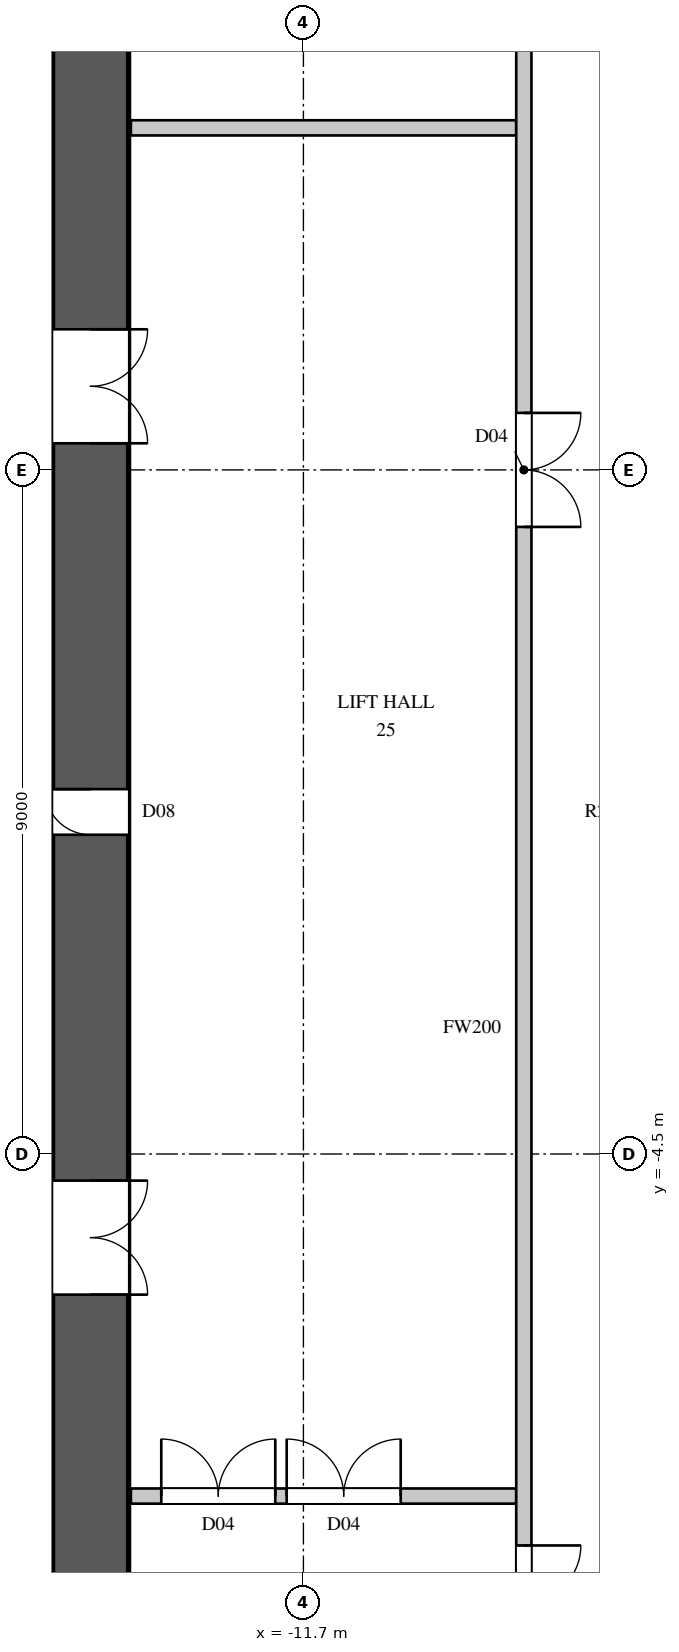
"""IFC4 building model, lengths in metres.
Left out: names, types, materials, properties, quantities, classifications, styles, units other than length and angle.
Written with IfcOpenShell. Run it as: python <this file> out.ifc"""

import sys

from ifc_helpers import new_model, si_unit, direction, frame, frame_2d, origin, place, context, subcontext, project, spatial, rectangle, extrude, element, fill, save


model = new_model("IFC4")
c1 = context("Model", 3, precision=1e-05, world=origin(), true_north=direction((0.0, 1.0)))
c2 = subcontext(c1, "Body", "Model", "MODEL_VIEW")
j1 = project(units=[si_unit("LENGTHUNIT", "METRE"), si_unit("PLANEANGLEUNIT", "RADIAN")], contexts=[c1])
p1 = place(None, origin())
s1 = spatial("IfcSite", under=j1, at=p1, CompositionType="ELEMENT")
p2 = place(p1, origin())
s2 = spatial("IfcBuilding", under=s1, at=p2, CompositionType="ELEMENT")
p3 = place(p2, frame((0.0, 0.0, 120.3)))
s3 = spatial("IfcBuildingStorey", under=s2, at=p3, CompositionType="ELEMENT", Elevation=120.3)
p4 = place(p3, frame((-14.5, -14.8, 0.0), z_axis=(0.0, 0.0, 1.0), x_axis=(0.0, 1.0, 0.0)))
e1 = element("IfcWall", 1, at=p4, inside=s3, PredefinedType="SHEAR", context=c2, shape_type="SweptSolid", body=[
    extrude(rectangle(XDim=29.6, YDim=1.0, at=frame_2d((14.8, 0.0))), origin(), (0.0, 0.0, 1.0), 3.6),
])
p5 = place(p4, frame((8.45, 0.0, 0.0)))
e2 = element("IfcOpeningElement", 2, at=p5, cuts=e1, PredefinedType="OPENING", context=c2, shape_type="SweptSolid", body=[
    extrude(rectangle(XDim=1.5, YDim=2.4, at=frame_2d((0.75, 1.2))), frame((0.0, 0.51, 0.0), z_axis=(0.0, -1.0, 0.0), x_axis=(1.0, 0.0, 0.0)), (0.0, 0.0, 1.0), 1.02),
])
p6 = place(p4, frame((19.65, 0.0, 0.0)))
e3 = element("IfcOpeningElement", 3, at=p6, cuts=e1, PredefinedType="OPENING", context=c2, shape_type="SweptSolid", body=[
    extrude(rectangle(XDim=1.5, YDim=2.4, at=frame_2d((0.75, 1.2))), frame((0.0, 0.51, 0.0), z_axis=(0.0, -1.0, 0.0), x_axis=(1.0, 0.0, 0.0)), (0.0, 0.0, 1.0), 1.02),
])
p7 = place(p4, frame((14.5, 0.0, 0.0)))
e4 = element("IfcOpeningElement", 4, at=p7, cuts=e1, PredefinedType="OPENING", context=c2, shape_type="SweptSolid", body=[
    extrude(rectangle(XDim=0.6, YDim=2.0, at=frame_2d((0.3, 1.0))), frame((0.0, 0.51, 0.0), z_axis=(0.0, -1.0, 0.0), x_axis=(1.0, 0.0, 0.0)), (0.0, 0.0, 1.0), 1.02),
])
p8 = place(p3, frame((-13.97, -9.0, 0.0), z_axis=(0.0, 0.0, 1.0), x_axis=(1.0, 0.0, 0.0)))
e5 = element("IfcWall", 5, at=p8, inside=s3, PredefinedType="PARTITIONING", context=c2, shape_type="SweptSolid", body=[
    extrude(rectangle(XDim=5.07, YDim=0.2, at=frame_2d((2.535, 0.0))), origin(), (0.0, 0.0, 1.0), 3.3),
])
p9 = place(p8, frame((0.4, 0.0, 0.0)))
e6 = element("IfcOpeningElement", 6, at=p9, cuts=e5, PredefinedType="OPENING", context=c2, shape_type="SweptSolid", body=[
    extrude(rectangle(XDim=1.5, YDim=2.2, at=frame_2d((0.75, 1.1))), frame((0.0, 0.11, 0.0), z_axis=(0.0, -1.0, 0.0), x_axis=(1.0, 0.0, 0.0)), (0.0, 0.0, 1.0), 0.22),
])
p10 = place(p8, frame((2.05, 0.0, 0.0)))
e7 = element("IfcOpeningElement", 7, at=p10, cuts=e5, PredefinedType="OPENING", context=c2, shape_type="SweptSolid", body=[
    extrude(rectangle(XDim=1.5, YDim=2.2, at=frame_2d((0.75, 1.1))), frame((0.0, 0.11, 0.0), z_axis=(0.0, -1.0, 0.0), x_axis=(1.0, 0.0, 0.0)), (0.0, 0.0, 1.0), 0.22),
])
p11 = place(p3, frame((-13.97, 9.0, 0.0), z_axis=(0.0, 0.0, 1.0), x_axis=(1.0, 0.0, 0.0)))
e8 = element("IfcWall", 8, at=p11, inside=s3, PredefinedType="PARTITIONING", context=c2, shape_type="SweptSolid", body=[
    extrude(rectangle(XDim=5.07, YDim=0.2, at=frame_2d((2.535, 0.0))), origin(), (0.0, 0.0, 1.0), 3.3),
])
p12 = place(p3, frame((-8.8, -17.4, 0.0), z_axis=(0.0, 0.0, 1.0), x_axis=(0.0, 1.0, 0.0)))
e9 = element("IfcWall", 9, at=p12, inside=s3, PredefinedType="PARTITIONING", context=c2, shape_type="SweptSolid", body=[
    extrude(rectangle(XDim=29.1, YDim=0.2, at=frame_2d((14.55, 0.0))), origin(), (0.0, 0.0, 1.0), 3.3),
])
p13 = place(p12, frame((21.15, 0.0, 0.0)))
e10 = element("IfcOpeningElement", 10, at=p13, cuts=e9, PredefinedType="OPENING", context=c2, shape_type="SweptSolid", body=[
    extrude(rectangle(XDim=1.5, YDim=2.2, at=frame_2d((0.75, 1.1))), frame((0.0, 0.11, 0.0), z_axis=(0.0, -1.0, 0.0), x_axis=(1.0, 0.0, 0.0)), (0.0, 0.0, 1.0), 0.22),
])
p14 = place(p12, frame((6.25, 0.0, 0.0)))
e11 = element("IfcOpeningElement", 11, at=p14, cuts=e9, PredefinedType="OPENING", context=c2, shape_type="SweptSolid", body=[
    extrude(rectangle(XDim=1.5, YDim=2.2, at=frame_2d((0.75, 1.1))), frame((0.0, 0.11, 0.0), z_axis=(0.0, -1.0, 0.0), x_axis=(1.0, 0.0, 0.0)), (0.0, 0.0, 1.0), 0.22),
])
p15 = place(p12, frame((27.45, 0.0, 0.0)))
e12 = element("IfcOpeningElement", 12, at=p15, cuts=e9, PredefinedType="OPENING", context=c2, shape_type="SweptSolid", body=[
    extrude(rectangle(XDim=1.5, YDim=2.2, at=frame_2d((0.75, 1.1))), frame((0.0, 0.11, 0.0), z_axis=(0.0, -1.0, 0.0), x_axis=(1.0, 0.0, 0.0)), (0.0, 0.0, 1.0), 0.22),
])
p16 = place(p12, frame((0.15, 0.0, 0.0)))
e13 = element("IfcOpeningElement", 13, at=p16, cuts=e9, PredefinedType="OPENING", context=c2, shape_type="SweptSolid", body=[
    extrude(rectangle(XDim=0.9, YDim=2.2, at=frame_2d((0.45, 1.1))), frame((0.0, 0.11, 0.0), z_axis=(0.0, -1.0, 0.0), x_axis=(1.0, 0.0, 0.0)), (0.0, 0.0, 1.0), 0.22),
])
p17 = place(p13, origin())
e14 = element("IfcDoor", 14, at=p17, inside=s3, OperationType="DOUBLE_DOOR_SINGLE_SWING", PredefinedType="DOOR", context=c2, shape_type="SweptSolid", body=[
    extrude(rectangle(XDim=1.5, YDim=2.2, at=frame_2d((0.75, 1.1))), frame((0.0, 0.025, 0.0), z_axis=(0.0, -1.0, 0.0), x_axis=(1.0, 0.0, 0.0)), (0.0, 0.0, 1.0), 0.05),
])
fill(e10, e14)
p18 = place(p9, origin())
e15 = element("IfcDoor", 15, at=p18, inside=s3, OperationType="DOUBLE_DOOR_SINGLE_SWING", PredefinedType="DOOR", context=c2, shape_type="SweptSolid", body=[
    extrude(rectangle(XDim=1.5, YDim=2.2, at=frame_2d((0.75, 1.1))), frame((0.0, 0.025, 0.0), z_axis=(0.0, -1.0, 0.0), x_axis=(1.0, 0.0, 0.0)), (0.0, 0.0, 1.0), 0.05),
])
fill(e6, e15)
p19 = place(p10, origin())
e16 = element("IfcDoor", 16, at=p19, inside=s3, OperationType="DOUBLE_DOOR_SINGLE_SWING", PredefinedType="DOOR", context=c2, shape_type="SweptSolid", body=[
    extrude(rectangle(XDim=1.5, YDim=2.2, at=frame_2d((0.75, 1.1))), frame((0.0, 0.025, 0.0), z_axis=(0.0, -1.0, 0.0), x_axis=(1.0, 0.0, 0.0)), (0.0, 0.0, 1.0), 0.05),
])
fill(e7, e16)
p20 = place(p14, origin())
e17 = element("IfcDoor", 17, at=p20, inside=s3, OperationType="DOUBLE_DOOR_SINGLE_SWING", PredefinedType="DOOR", context=c2, shape_type="SweptSolid", body=[
    extrude(rectangle(XDim=1.5, YDim=2.2, at=frame_2d((0.75, 1.1))), frame((0.0, 0.025, 0.0), z_axis=(0.0, -1.0, 0.0), x_axis=(1.0, 0.0, 0.0)), (0.0, 0.0, 1.0), 0.05),
])
fill(e11, e17)
p21 = place(p5, origin())
e18 = element("IfcDoor", 18, at=p21, inside=s3, OperationType="DOUBLE_DOOR_SINGLE_SWING", PredefinedType="DOOR", context=c2, shape_type="SweptSolid", body=[
    extrude(rectangle(XDim=1.5, YDim=2.4, at=frame_2d((0.75, 1.2))), frame((0.0, -0.445, 0.0), z_axis=(0.0, -1.0, 0.0), x_axis=(1.0, 0.0, 0.0)), (0.0, 0.0, 1.0), 0.05),
])
fill(e2, e18)
p22 = place(p6, origin())
e19 = element("IfcDoor", 19, at=p22, inside=s3, OperationType="DOUBLE_DOOR_SINGLE_SWING", PredefinedType="DOOR", context=c2, shape_type="SweptSolid", body=[
    extrude(rectangle(XDim=1.5, YDim=2.4, at=frame_2d((0.75, 1.2))), frame((0.0, -0.445, 0.0), z_axis=(0.0, -1.0, 0.0), x_axis=(1.0, 0.0, 0.0)), (0.0, 0.0, 1.0), 0.05),
])
fill(e3, e19)
p23 = place(p7, origin())
e20 = element("IfcDoor", 20, at=p23, inside=s3, OperationType="SINGLE_SWING_RIGHT", PredefinedType="DOOR", context=c2, shape_type="SweptSolid", body=[
    extrude(rectangle(XDim=0.6, YDim=2.0, at=frame_2d((0.3, 1.0))), frame((0.0, 0.495, 0.0), z_axis=(0.0, -1.0, 0.0), x_axis=(1.0, 0.0, 0.0)), (0.0, 0.0, 1.0), 0.05),
])
fill(e4, e20)
save(model, sys.argv[1])
